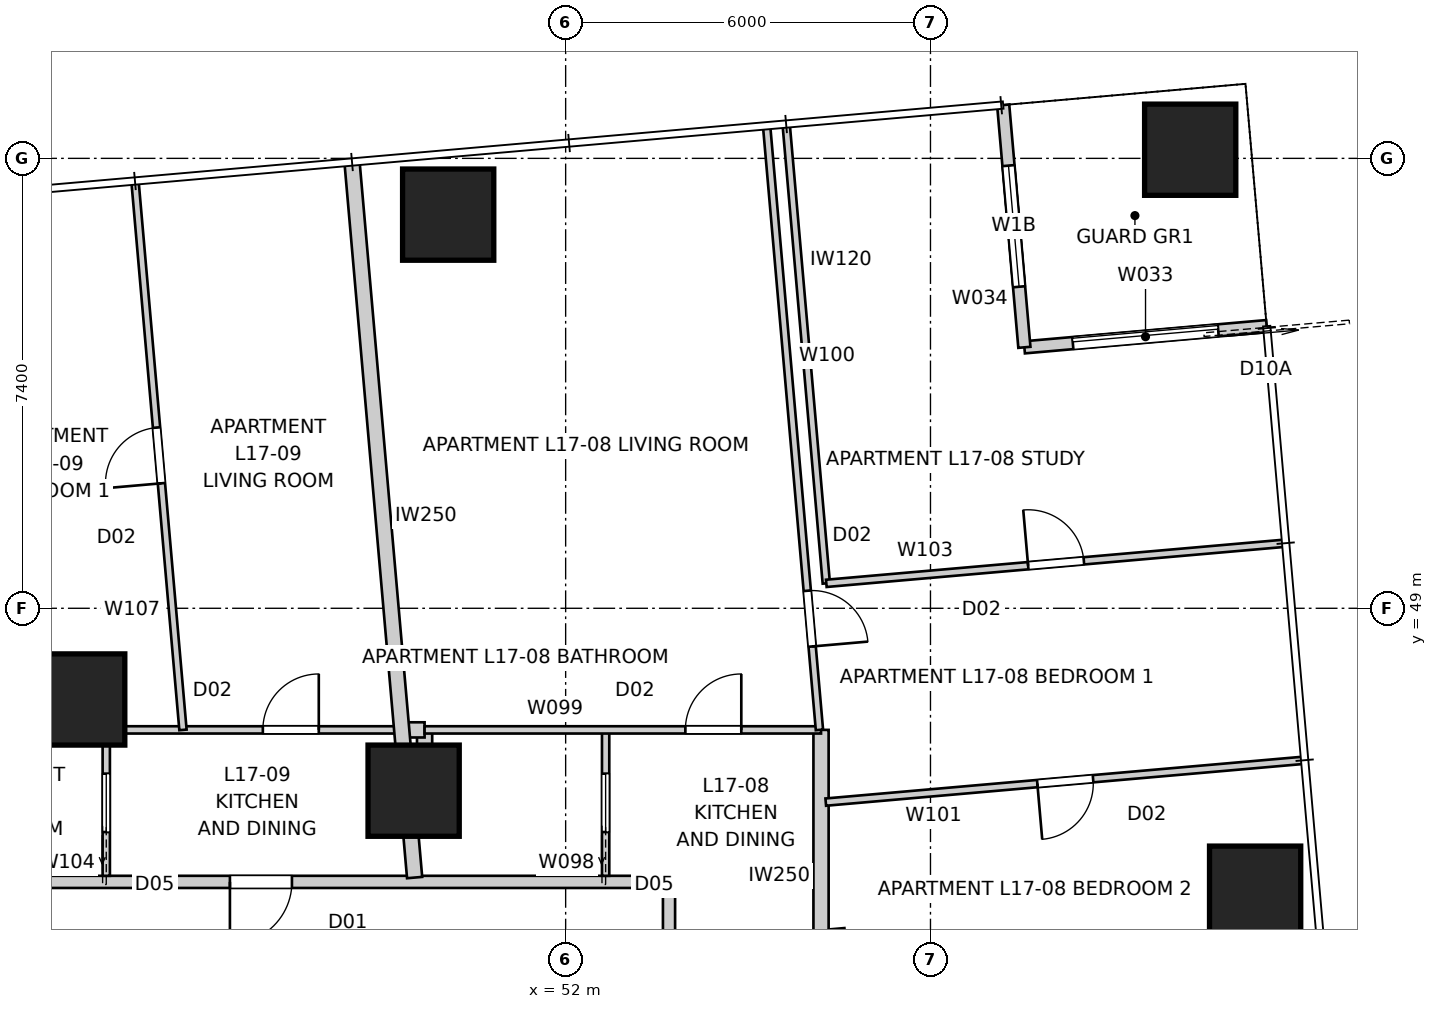
"""IFC4 building model, lengths in metres.
Left out: names, types, materials, properties, quantities, classifications, styles, units other than length and angle.
Written with IfcOpenShell. Run it as: python <this file> out.ifc"""

import sys

from ifc_helpers import new_model, si_unit, direction, frame, frame_2d, origin, origin_2d, place, context, subcontext, project, spatial, rectangle, extrude, element, fill, save


model = new_model("IFC4")
c1 = context("Model", 3, precision=1e-05, world=origin(), true_north=direction((0.0, 1.0)))
c2 = subcontext(c1, "Body", "Model", "MODEL_VIEW")
j1 = project(units=[si_unit("LENGTHUNIT", "METRE"), si_unit("PLANEANGLEUNIT", "RADIAN")], contexts=[c1])
p1 = place(None, origin())
s1 = spatial("IfcSite", under=j1, at=p1, CompositionType="ELEMENT")
p2 = place(p1, origin())
s2 = spatial("IfcBuilding", under=s1, at=p2, CompositionType="ELEMENT")
p3 = place(p2, frame((0.0, 0.0, 64.2)))
s3 = spatial("IfcBuildingStorey", under=s2, at=p3, CompositionType="ELEMENT", Elevation=64.2)
for number, where, z_axis, x_axis in (
    (1, (63.339, 44.339, 0.0), (0.0, 0.0, 1.0), (1.0, 0.0, 0.0)),
    (2, (62.271, 56.542, 0.0), (0.0, 0.0, 1.0), (1.0, 0.0, 0.0)),
    (3, (50.068, 55.474, 0.0), (0.0, 0.0, 1.0), (1.0, 0.0, 0.0)),
    (4, (49.5, 46.0, 0.0), (0.0, 0.0, 1.0), (1.0, 0.0, 0.0)),
    (5, (44.0, 47.5, 0.0), (0.0, 0.0, 1.0), (1.0, 0.0, 0.0)),
):
    element("IfcColumn", number, at=place(p3, frame(where, z_axis=z_axis, x_axis=x_axis)), inside=s3, PredefinedType="COLUMN", context=c2, shape_type="SweptSolid", body=[
        extrude(rectangle(XDim=1.5, YDim=1.5, at=origin_2d()), origin(), (0.0, 0.0, 1.0), 3.4),
    ])
p4 = place(p3, frame((63.529, 53.641, 0.0), z_axis=(0.0, 0.0, 1.0), x_axis=(-0.99619418125, -0.087161650072, 0.0)))
e6 = element("IfcWall", 6, at=p4, inside=s3, PredefinedType="SOLIDWALL", context=c2, shape_type="SweptSolid", body=[
    extrude(rectangle(XDim=4.0, YDim=0.2, at=frame_2d((2.0, 0.0))), origin(), (0.0, 0.0, 1.0), 3.25),
])
p5 = place(p4, frame((0.8, 0.0, 0.0)))
e7 = element("IfcOpeningElement", 7, at=p5, cuts=e6, PredefinedType="OPENING", context=c2, shape_type="SweptSolid", body=[
    extrude(rectangle(XDim=2.4, YDim=2.1, at=frame_2d((1.2, 1.05))), frame((0.0, 0.11, 0.0), z_axis=(0.0, -1.0, 0.0), x_axis=(1.0, 0.0, 0.0)), (0.0, 0.0, 1.0), 0.22),
])
p6 = place(p3, frame((59.544, 53.292, 0.0), z_axis=(0.0, 0.0, 1.0), x_axis=(-0.087156350505, 0.99619464492, 0.0)))
e8 = element("IfcWall", 8, at=p6, inside=s3, PredefinedType="SOLIDWALL", context=c2, shape_type="SweptSolid", body=[
    extrude(rectangle(XDim=4.0, YDim=0.2, at=frame_2d((2.0, 0.0))), origin(), (0.0, 0.0, 1.0), 3.25),
])
p7 = place(p6, frame((1.0, 0.0, 0.45)))
e9 = element("IfcOpeningElement", 9, at=p7, cuts=e8, PredefinedType="OPENING", context=c2, shape_type="SweptSolid", body=[
    extrude(rectangle(XDim=2.0, YDim=1.8, at=frame_2d((1.0, 0.9))), frame((0.0, 0.11, 0.0), z_axis=(0.0, -1.0, 0.0), x_axis=(1.0, 0.0, 0.0)), (0.0, 0.0, 1.0), 0.22),
])
p8 = place(p3, frame((53.7, 15.5, 0.0), z_axis=(0.0, 0.0, 1.0), x_axis=(0.0, 1.0, 0.0)))
e10 = element("IfcWall", 10, at=p8, inside=s3, PredefinedType="PARTITIONING", context=c2, shape_type="SweptSolid", body=[
    extrude(rectangle(XDim=29.0, YDim=0.2, at=frame_2d((14.5, 0.0))), origin(), (0.0, 0.0, 1.0), 3.25),
])
p9 = place(p8, frame((12.997, 0.0, 0.0)))
e11 = element("IfcOpeningElement", 11, at=p9, cuts=e10, PredefinedType="OPENING", context=c2, shape_type="SweptSolid", body=[
    extrude(rectangle(XDim=1.02, YDim=2.34, at=frame_2d((0.51, 1.17))), frame((0.0, 0.11, 0.0), z_axis=(0.0, -1.0, 0.0), x_axis=(1.0, 0.0, 0.0)), (0.0, 0.0, 1.0), 0.22),
])
p10 = place(p8, frame((19.891, 0.0, 0.0)))
e12 = element("IfcOpeningElement", 12, at=p10, cuts=e10, PredefinedType="OPENING", context=c2, shape_type="SweptSolid", body=[
    extrude(rectangle(XDim=1.02, YDim=2.34, at=frame_2d((0.51, 1.17))), frame((0.0, 0.11, 0.0), z_axis=(0.0, -1.0, 0.0), x_axis=(1.0, 0.0, 0.0)), (0.0, 0.0, 1.0), 0.22),
])
p11 = place(p8, frame((2.425, 0.0, 0.0)))
e13 = element("IfcOpeningElement", 13, at=p11, cuts=e10, PredefinedType="OPENING", context=c2, shape_type="SweptSolid", body=[
    extrude(rectangle(XDim=1.02, YDim=2.1, at=frame_2d((0.51, 1.05))), frame((0.0, 0.11, 0.0), z_axis=(0.0, -1.0, 0.0), x_axis=(1.0, 0.0, 0.0)), (0.0, 0.0, 1.0), 0.22),
])
p12 = place(p8, frame((27.055, 0.0, 0.0)))
e14 = element("IfcOpeningElement", 14, at=p12, cuts=e10, PredefinedType="OPENING", context=c2, shape_type="SweptSolid", body=[
    extrude(rectangle(XDim=1.02, YDim=2.34, at=frame_2d((0.51, 1.17))), frame((0.0, 0.11, 0.0), z_axis=(0.0, -1.0, 0.0), x_axis=(1.0, 0.0, 0.0)), (0.0, 0.0, 1.0), 0.22),
])
p13 = place(p3, frame((53.7, 44.5, 0.0), z_axis=(0.0, 0.0, 1.0), x_axis=(-1.0, 0.0, 0.0)))
e15 = element("IfcWall", 15, at=p13, inside=s3, PredefinedType="PARTITIONING", context=c2, shape_type="SweptSolid", body=[
    extrude(rectangle(XDim=27.4, YDim=0.2, at=frame_2d((13.7, 0.0))), origin(), (0.0, 0.0, 1.0), 3.25),
])
p14 = place(p13, frame((21.021, 0.0, 0.0)))
e16 = element("IfcOpeningElement", 16, at=p14, cuts=e15, PredefinedType="OPENING", context=c2, shape_type="SweptSolid", body=[
    extrude(rectangle(XDim=1.02, YDim=2.34, at=frame_2d((0.51, 1.17))), frame((0.0, 0.11, 0.0), z_axis=(0.0, -1.0, 0.0), x_axis=(1.0, 0.0, 0.0)), (0.0, 0.0, 1.0), 0.22),
])
p15 = place(p13, frame((6.201, 0.0, 0.0)))
e17 = element("IfcOpeningElement", 17, at=p15, cuts=e15, PredefinedType="OPENING", context=c2, shape_type="SweptSolid", body=[
    extrude(rectangle(XDim=1.02, YDim=2.34, at=frame_2d((0.51, 1.17))), frame((0.0, 0.11, 0.0), z_axis=(0.0, -1.0, 0.0), x_axis=(1.0, 0.0, 0.0)), (0.0, 0.0, 1.0), 0.22),
])
p16 = place(p3, frame((48.487, 56.34, 0.0), z_axis=(0.0, 0.0, 1.0), x_axis=(0.087168232078, -0.996193605338, 0.0)))
e18 = element("IfcWall", 18, at=p16, inside=s3, PredefinedType="PARTITIONING", context=c2, shape_type="SweptSolid", body=[
    extrude(rectangle(XDim=11.814, YDim=0.25, at=frame_2d((5.907, 0.0))), origin(), (0.0, 0.0, 1.0), 3.25),
])
p17 = place(p3, frame((56.2, 42.208, 0.0), z_axis=(0.0, 0.0, 1.0), x_axis=(0.0, 1.0, 0.0)))
e19 = element("IfcWall", 19, at=p17, inside=s3, PredefinedType="PARTITIONING", context=c2, shape_type="SweptSolid", body=[
    extrude(rectangle(XDim=4.792, YDim=0.25, at=frame_2d((2.396, 0.0))), origin(), (0.0, 0.0, 1.0), 3.25),
])
p18 = place(p3, frame((56.46, 43.729, 0.0), z_axis=(0.0, 0.0, 1.0), x_axis=(0.087133819286, -0.996196615903, 0.0)))
e20 = element("IfcWall", 20, at=p18, inside=s3, PredefinedType="PARTITIONING", context=c2, shape_type="SweptSolid", body=[
    extrude(rectangle(XDim=1.463, YDim=0.25, at=frame_2d((0.731, 0.0))), origin(), (0.0, 0.0, 1.0), 3.25),
])
p19 = place(p3, frame((49.68, 47.0, 0.0), z_axis=(0.0, 0.0, 1.0), x_axis=(0.0, -1.0, 0.0)))
e21 = element("IfcWall", 21, at=p19, inside=s3, PredefinedType="PARTITIONING", context=c2, shape_type="SweptSolid", body=[
    extrude(rectangle(XDim=1.549, YDim=0.25, at=frame_2d((0.774, 0.0))), origin(), (0.0, 0.0, 1.0), 3.25),
])
p20 = place(p3, frame((49.328, 47.0, 0.0), z_axis=(0.0, 0.0, 1.0), x_axis=(0.999999759208, -0.000693962359, 0.0)))
e22 = element("IfcWall", 22, at=p20, inside=s3, PredefinedType="PARTITIONING", context=c2, shape_type="SweptSolid", body=[
    extrude(rectangle(XDim=0.352, YDim=0.25, at=frame_2d((0.176, 0.0))), origin(), (0.0, 0.0, 1.0), 3.25),
])
p21 = place(p3, frame((52.657, 44.6, 0.0), z_axis=(0.0, 0.0, 1.0), x_axis=(0.0, 1.0, 0.0)))
e23 = element("IfcWall", 23, at=p21, inside=s3, PredefinedType="PARTITIONING", context=c2, shape_type="SweptSolid", body=[
    extrude(rectangle(XDim=2.4, YDim=0.12, at=frame_2d((1.2, 0.0))), origin(), (0.0, 0.0, 1.0), 3.25),
])
p22 = place(p21, frame((0.72, 0.0, 0.0)))
e24 = element("IfcOpeningElement", 24, at=p22, cuts=e23, PredefinedType="OPENING", context=c2, shape_type="SweptSolid", body=[
    extrude(rectangle(XDim=0.96, YDim=2.1, at=frame_2d((0.48, 1.05))), frame((0.0, 0.07, 0.0), z_axis=(0.0, -1.0, 0.0), x_axis=(1.0, 0.0, 0.0)), (0.0, 0.0, 1.0), 0.14),
])
p23 = place(p3, frame((49.68, 47.0, 0.0), z_axis=(0.0, 0.0, 1.0), x_axis=(1.0, 0.0, 0.0)))
e25 = element("IfcWall", 25, at=p23, inside=s3, PredefinedType="PARTITIONING", context=c2, shape_type="SweptSolid", body=[
    extrude(rectangle(XDim=6.52, YDim=0.12, at=frame_2d((3.26, 0.0))), origin(), (0.0, 0.0, 1.0), 3.25),
])
p24 = place(p23, frame((4.289, 0.0, 0.0)))
e26 = element("IfcOpeningElement", 26, at=p24, cuts=e25, PredefinedType="OPENING", context=c2, shape_type="SweptSolid", body=[
    extrude(rectangle(XDim=0.92, YDim=2.34, at=frame_2d((0.46, 1.17))), frame((0.0, 0.07, 0.0), z_axis=(0.0, -1.0, 0.0), x_axis=(1.0, 0.0, 0.0)), (0.0, 0.0, 1.0), 0.14),
])
p25 = place(p3, frame((55.308, 56.896, 0.0), z_axis=(0.0, 0.0, 1.0), x_axis=(0.087145000294, -0.996195637876, 0.0)))
e27 = element("IfcWall", 27, at=p25, inside=s3, PredefinedType="PARTITIONING", context=c2, shape_type="SweptSolid", body=[
    extrude(rectangle(XDim=9.934, YDim=0.12, at=frame_2d((4.967, 0.0))), origin(), (0.0, 0.0, 1.0), 3.25),
])
p26 = place(p25, frame((7.637, 0.0, 0.0)))
e28 = element("IfcOpeningElement", 28, at=p26, cuts=e27, PredefinedType="OPENING", context=c2, shape_type="SweptSolid", body=[
    extrude(rectangle(XDim=0.92, YDim=2.34, at=frame_2d((0.46, 1.17))), frame((0.0, 0.07, 0.0), z_axis=(0.0, -1.0, 0.0), x_axis=(1.0, 0.0, 0.0)), (0.0, 0.0, 1.0), 0.14),
])
p27 = place(p3, frame((64.114, 46.498, 0.0), z_axis=(0.0, 0.0, 1.0), x_axis=(-0.996194795495, -0.087154629416, 0.0)))
e29 = element("IfcWall", 29, at=p27, inside=s3, PredefinedType="PARTITIONING", context=c2, shape_type="SweptSolid", body=[
    extrude(rectangle(XDim=7.866, YDim=0.12, at=frame_2d((3.933, 0.0))), origin(), (0.0, 0.0, 1.0), 2.638),
])
p28 = place(p27, frame((3.453, 0.0, 0.0)))
e30 = element("IfcOpeningElement", 30, at=p28, cuts=e29, PredefinedType="OPENING", context=c2, shape_type="SweptSolid", body=[
    extrude(rectangle(XDim=0.92, YDim=2.34, at=frame_2d((0.46, 1.17))), frame((0.0, 0.07, 0.0), z_axis=(0.0, -1.0, 0.0), x_axis=(1.0, 0.0, 0.0)), (0.0, 0.0, 1.0), 0.14),
])
p29 = place(p3, frame((55.629, 56.925, 0.0), z_axis=(0.0, 0.0, 1.0), x_axis=(0.087158920508, -0.996194420069, 0.0)))
e31 = element("IfcWall", 31, at=p29, inside=s3, PredefinedType="PARTITIONING", context=c2, shape_type="SweptSolid", body=[
    extrude(rectangle(XDim=7.543, YDim=0.12, at=frame_2d((3.772, 0.0))), origin(), (0.0, 0.0, 1.0), 3.25),
])
p30 = place(p3, frame((56.287, 49.41, 0.0), z_axis=(0.0, 0.0, 1.0), x_axis=(0.996194420069, 0.087158920508, 0.0)))
e32 = element("IfcWall", 32, at=p30, inside=s3, PredefinedType="PARTITIONING", context=c2, shape_type="SweptSolid", body=[
    extrude(rectangle(XDim=7.543, YDim=0.12, at=frame_2d((3.772, 0.0))), origin(), (0.0, 0.0, 1.0), 3.25),
])
p31 = place(p30, frame((3.332, 0.0, 0.0)))
e33 = element("IfcOpeningElement", 33, at=p31, cuts=e32, PredefinedType="OPENING", context=c2, shape_type="SweptSolid", body=[
    extrude(rectangle(XDim=0.92, YDim=2.34, at=frame_2d((0.46, 1.17))), frame((0.0, 0.07, 0.0), z_axis=(0.0, -1.0, 0.0), x_axis=(1.0, 0.0, 0.0)), (0.0, 0.0, 1.0), 0.14),
])
p32 = place(p3, frame((44.445, 44.6, 0.0), z_axis=(0.0, 0.0, 1.0), x_axis=(0.0, 1.0, 0.0)))
e34 = element("IfcWall", 34, at=p32, inside=s3, PredefinedType="PARTITIONING", context=c2, shape_type="SweptSolid", body=[
    extrude(rectangle(XDim=2.4, YDim=0.12, at=frame_2d((1.2, 0.0))), origin(), (0.0, 0.0, 1.0), 3.25),
])
p33 = place(p32, frame((0.72, 0.0, 0.0)))
e35 = element("IfcOpeningElement", 35, at=p33, cuts=e34, PredefinedType="OPENING", context=c2, shape_type="SweptSolid", body=[
    extrude(rectangle(XDim=0.96, YDim=2.1, at=frame_2d((0.48, 1.05))), frame((0.0, 0.07, 0.0), z_axis=(0.0, -1.0, 0.0), x_axis=(1.0, 0.0, 0.0)), (0.0, 0.0, 1.0), 0.14),
])
p34 = place(p3, frame((31.319, 47.0, 0.0), z_axis=(0.0, 0.0, 1.0), x_axis=(1.0, 0.0, 0.0)))
e36 = element("IfcWall", 36, at=p34, inside=s3, PredefinedType="PARTITIONING", context=c2, shape_type="SweptSolid", body=[
    extrude(rectangle(XDim=17.985, YDim=0.12, at=frame_2d((8.993, 0.0))), origin(), (0.0, 0.0, 1.0), 2.55),
])
p35 = place(p34, frame((0.726, 0.0, 0.0)))
e37 = element("IfcOpeningElement", 37, at=p35, cuts=e36, PredefinedType="OPENING", context=c2, shape_type="SweptSolid", body=[
    extrude(rectangle(XDim=0.92, YDim=2.34, at=frame_2d((0.46, 1.17))), frame((0.0, 0.07, 0.0), z_axis=(0.0, -1.0, 0.0), x_axis=(1.0, 0.0, 0.0)), (0.0, 0.0, 1.0), 0.14),
])
p36 = place(p34, frame((15.701, 0.0, 0.0)))
e38 = element("IfcOpeningElement", 38, at=p36, cuts=e36, PredefinedType="OPENING", context=c2, shape_type="SweptSolid", body=[
    extrude(rectangle(XDim=0.92, YDim=2.34, at=frame_2d((0.46, 1.17))), frame((0.0, 0.07, 0.0), z_axis=(0.0, -1.0, 0.0), x_axis=(1.0, 0.0, 0.0)), (0.0, 0.0, 1.0), 0.14),
])
p37 = place(p34, frame((5.467, 0.0, 0.0)))
e39 = element("IfcOpeningElement", 39, at=p37, cuts=e36, PredefinedType="OPENING", context=c2, shape_type="SweptSolid", body=[
    extrude(rectangle(XDim=0.96, YDim=2.1, at=frame_2d((0.48, 1.05))), frame((0.0, 0.07, 0.0), z_axis=(0.0, -1.0, 0.0), x_axis=(1.0, 0.0, 0.0)), (0.0, 0.0, 1.0), 0.14),
])
p38 = place(p34, frame((8.05, 0.0, 0.0)))
e40 = element("IfcOpeningElement", 40, at=p38, cuts=e36, PredefinedType="OPENING", context=c2, shape_type="SweptSolid", body=[
    extrude(rectangle(XDim=0.96, YDim=2.1, at=frame_2d((0.48, 1.05))), frame((0.0, 0.07, 0.0), z_axis=(0.0, -1.0, 0.0), x_axis=(1.0, 0.0, 0.0)), (0.0, 0.0, 1.0), 0.14),
])
p39 = place(p3, frame((45.707, 47.0, 0.0), z_axis=(0.0, 0.0, 1.0), x_axis=(-0.087160907995, 0.996194246178, 0.0)))
e41 = element("IfcWall", 41, at=p39, inside=s3, PredefinedType="PARTITIONING", context=c2, shape_type="SweptSolid", body=[
    extrude(rectangle(XDim=9.022, YDim=0.12, at=frame_2d((4.511, 0.0))), origin(), (0.0, 0.0, 1.0), 3.25),
])
p40 = place(p39, frame((4.071, 0.0, 0.0)))
e42 = element("IfcOpeningElement", 42, at=p40, cuts=e41, PredefinedType="OPENING", context=c2, shape_type="SweptSolid", body=[
    extrude(rectangle(XDim=0.92, YDim=2.34, at=frame_2d((0.46, 1.17))), frame((0.0, 0.07, 0.0), z_axis=(0.0, -1.0, 0.0), x_axis=(1.0, 0.0, 0.0)), (0.0, 0.0, 1.0), 0.14),
])
p41 = place(p5, origin())
e43 = element("IfcDoor", 43, at=p41, inside=s3, OperationType="SLIDING_TO_LEFT", PredefinedType="DOOR", context=c2, shape_type="SweptSolid", body=[
    extrude(rectangle(XDim=2.4, YDim=2.1, at=frame_2d((1.2, 1.05))), frame((0.0, 0.025, 0.0), z_axis=(0.0, -1.0, 0.0), x_axis=(1.0, 0.0, 0.0)), (0.0, 0.0, 1.0), 0.05),
])
fill(e7, e43)
p42 = place(p7, origin())
e44 = element("IfcWindow", 44, at=p42, inside=s3, PartitioningType="SINGLE_PANEL", PredefinedType="WINDOW", context=c2, shape_type="SweptSolid", body=[
    extrude(rectangle(XDim=2.0, YDim=1.8, at=frame_2d((1.0, 0.9))), frame((0.0, 0.03, 0.0), z_axis=(0.0, -1.0, 0.0), x_axis=(1.0, 0.0, 0.0)), (0.0, 0.0, 1.0), 0.06),
])
fill(e9, e44)
p43 = place(p15, origin())
e45 = element("IfcDoor", 45, at=p43, inside=s3, OperationType="SINGLE_SWING_RIGHT", PredefinedType="DOOR", context=c2, shape_type="SweptSolid", body=[
    extrude(rectangle(XDim=1.02, YDim=2.34, at=frame_2d((0.51, 1.17))), frame((0.0, 0.025, 0.0), z_axis=(0.0, -1.0, 0.0), x_axis=(1.0, 0.0, 0.0)), (0.0, 0.0, 1.0), 0.05),
])
fill(e17, e45)
p44 = place(p36, origin())
e46 = element("IfcDoor", 46, at=p44, inside=s3, OperationType="SINGLE_SWING_RIGHT", PredefinedType="DOOR", context=c2, shape_type="SweptSolid", body=[
    extrude(rectangle(XDim=0.92, YDim=2.34, at=frame_2d((0.46, 1.17))), frame((0.0, 0.025, 0.0), z_axis=(0.0, -1.0, 0.0), x_axis=(1.0, 0.0, 0.0)), (0.0, 0.0, 1.0), 0.05),
])
fill(e38, e46)
p45 = place(p33, origin())
e47 = element("IfcDoor", 47, at=p45, inside=s3, OperationType="SLIDING_TO_LEFT", PredefinedType="DOOR", context=c2, shape_type="SweptSolid", body=[
    extrude(rectangle(XDim=0.96, YDim=2.1, at=frame_2d((0.48, 1.05))), frame((0.0, 0.025, 0.0), z_axis=(0.0, -1.0, 0.0), x_axis=(1.0, 0.0, 0.0)), (0.0, 0.0, 1.0), 0.05),
])
fill(e35, e47)
p46 = place(p24, origin())
e48 = element("IfcDoor", 48, at=p46, inside=s3, OperationType="SINGLE_SWING_RIGHT", PredefinedType="DOOR", context=c2, shape_type="SweptSolid", body=[
    extrude(rectangle(XDim=0.92, YDim=2.34, at=frame_2d((0.46, 1.17))), frame((0.0, 0.025, 0.0), z_axis=(0.0, -1.0, 0.0), x_axis=(1.0, 0.0, 0.0)), (0.0, 0.0, 1.0), 0.05),
])
fill(e26, e48)
p47 = place(p22, origin())
e49 = element("IfcDoor", 49, at=p47, inside=s3, OperationType="SLIDING_TO_LEFT", PredefinedType="DOOR", context=c2, shape_type="SweptSolid", body=[
    extrude(rectangle(XDim=0.96, YDim=2.1, at=frame_2d((0.48, 1.05))), frame((0.0, 0.025, 0.0), z_axis=(0.0, -1.0, 0.0), x_axis=(1.0, 0.0, 0.0)), (0.0, 0.0, 1.0), 0.05),
])
fill(e24, e49)
p48 = place(p40, origin())
e50 = element("IfcDoor", 50, at=p48, inside=s3, OperationType="SINGLE_SWING_LEFT", PredefinedType="DOOR", context=c2, shape_type="SweptSolid", body=[
    extrude(rectangle(XDim=0.92, YDim=2.34, at=frame_2d((0.46, 1.17))), frame((0.0, 0.025, 0.0), z_axis=(0.0, -1.0, 0.0), x_axis=(1.0, 0.0, 0.0)), (0.0, 0.0, 1.0), 0.05),
])
fill(e42, e50)
p49 = place(p26, origin())
e51 = element("IfcDoor", 51, at=p49, inside=s3, OperationType="SINGLE_SWING_RIGHT", PredefinedType="DOOR", context=c2, shape_type="SweptSolid", body=[
    extrude(rectangle(XDim=0.92, YDim=2.34, at=frame_2d((0.46, 1.17))), frame((0.0, 0.025, 0.0), z_axis=(0.0, -1.0, 0.0), x_axis=(1.0, 0.0, 0.0)), (0.0, 0.0, 1.0), 0.05),
])
fill(e28, e51)
p50 = place(p28, origin())
e52 = element("IfcDoor", 52, at=p50, inside=s3, OperationType="SINGLE_SWING_RIGHT", PredefinedType="DOOR", context=c2, shape_type="SweptSolid", body=[
    extrude(rectangle(XDim=0.92, YDim=2.34, at=frame_2d((0.46, 1.17))), frame((0.0, 0.025, 0.0), z_axis=(0.0, -1.0, 0.0), x_axis=(1.0, 0.0, 0.0)), (0.0, 0.0, 1.0), 0.05),
])
fill(e30, e52)
p51 = place(p31, origin())
e53 = element("IfcDoor", 53, at=p51, inside=s3, OperationType="SINGLE_SWING_LEFT", PredefinedType="DOOR", context=c2, shape_type="SweptSolid", body=[
    extrude(rectangle(XDim=0.92, YDim=2.34, at=frame_2d((0.46, 1.17))), frame((0.0, 0.025, 0.0), z_axis=(0.0, -1.0, 0.0), x_axis=(1.0, 0.0, 0.0)), (0.0, 0.0, 1.0), 0.05),
])
fill(e33, e53)
save(model, sys.argv[1])
